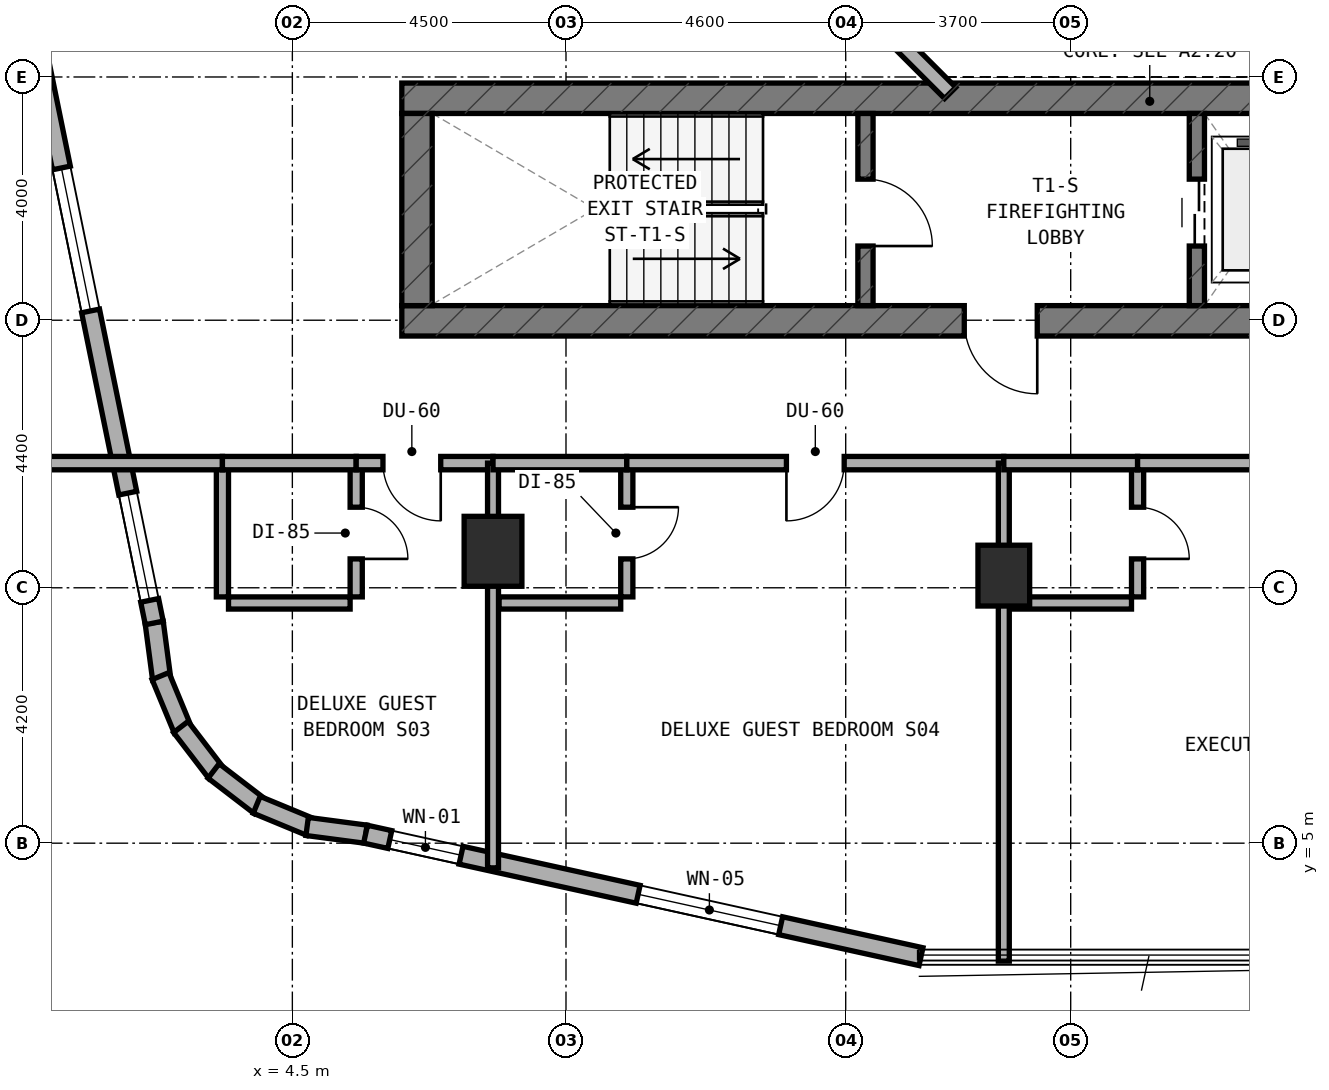
"""IFC4 building model, lengths in metres.
Left out: names, types, materials, properties, quantities, classifications, styles, units other than length and angle.
Written with IfcOpenShell. Run it as: python <this file> out.ifc"""

import sys

from ifc_helpers import new_model, si_unit, direction, frame, frame_2d, origin, origin_2d, place, context, subcontext, project, spatial, rectangle, extrude, element, fill, save


model = new_model("IFC4")
c1 = context("Model", 3, precision=1e-05, world=origin(), true_north=direction((0.0, 1.0)))
c2 = subcontext(c1, "Body", "Model", "MODEL_VIEW")
j1 = project(units=[si_unit("LENGTHUNIT", "METRE"), si_unit("PLANEANGLEUNIT", "RADIAN")], contexts=[c1])
p1 = place(None, origin())
s1 = spatial("IfcSite", under=j1, at=p1, CompositionType="ELEMENT")
p2 = place(p1, origin())
s2 = spatial("IfcBuilding", under=s1, at=p2, CompositionType="ELEMENT")
p3 = place(p2, frame((0.0, 0.0, 83.5)))
s3 = spatial("IfcBuildingStorey", under=s2, at=p3, CompositionType="ELEMENT", Elevation=83.5)
p4 = place(p3, frame((6.3, 13.59, 0.0), z_axis=(0.0, 0.0, 1.0), x_axis=(1.0, 0.0, 0.0)))
e1 = element("IfcWall", 1, at=p4, inside=s3, PredefinedType="SHEAR", context=c2, shape_type="SweptSolid", body=[
    extrude(rectangle(XDim=24.6, YDim=0.5, at=frame_2d((12.3, 0.0))), origin(), (0.0, 0.0, 1.0), 3.5),
])
p5 = place(p4, frame((9.25, 0.0, 0.0)))
e2 = element("IfcOpeningElement", 2, at=p5, cuts=e1, PredefinedType="OPENING", context=c2, shape_type="SweptSolid", body=[
    extrude(rectangle(XDim=1.2, YDim=2.15, at=frame_2d((0.6, 1.075))), frame((0.0, 0.26, 0.0), z_axis=(0.0, -1.0, 0.0), x_axis=(1.0, 0.0, 0.0)), (0.0, 0.0, 1.0), 0.52),
])
p6 = place(p4, frame((17.04, 0.0, 0.0)))
e3 = element("IfcOpeningElement", 3, at=p6, cuts=e1, PredefinedType="OPENING", context=c2, shape_type="SweptSolid", body=[
    extrude(rectangle(XDim=0.85, YDim=2.1, at=frame_2d((0.425, 1.05))), frame((0.0, 0.26, 0.0), z_axis=(0.0, -1.0, 0.0), x_axis=(1.0, 0.0, 0.0)), (0.0, 0.0, 1.0), 0.52),
])
p7 = place(p3, frame((6.3, 17.25, 0.0), z_axis=(0.0, 0.0, 1.0), x_axis=(1.0, 0.0, 0.0)))
e4 = element("IfcWall", 4, at=p7, inside=s3, PredefinedType="SHEAR", context=c2, shape_type="SweptSolid", body=[
    extrude(rectangle(XDim=24.6, YDim=0.5, at=frame_2d((12.3, 0.0))), origin(), (0.0, 0.0, 1.0), 3.5),
])
p8 = place(p3, frame((6.55, 13.84, 0.0), z_axis=(0.0, 0.0, 1.0), x_axis=(0.0, 1.0, 0.0)))
e5 = element("IfcWall", 5, at=p8, inside=s3, PredefinedType="SHEAR", context=c2, shape_type="SweptSolid", body=[
    extrude(rectangle(XDim=3.16, YDim=0.5, at=frame_2d((1.58, 0.0))), origin(), (0.0, 0.0, 1.0), 3.5),
])
p9 = place(p3, frame((13.925, 13.84, 0.0), z_axis=(0.0, 0.0, 1.0), x_axis=(0.0, 1.0, 0.0)))
e6 = element("IfcWall", 6, at=p9, inside=s3, PredefinedType="STANDARD", context=c2, shape_type="SweptSolid", body=[
    extrude(rectangle(XDim=3.16, YDim=0.25, at=frame_2d((1.58, 0.0))), origin(), (0.0, 0.0, 1.0), 3.22),
])
p10 = place(p9, frame((0.98, 0.0, 0.0)))
e7 = element("IfcOpeningElement", 7, at=p10, cuts=e6, PredefinedType="OPENING", context=c2, shape_type="SweptSolid", body=[
    extrude(rectangle(XDim=1.1, YDim=2.15, at=frame_2d((0.55, 1.075))), frame((0.0, 0.135, 0.0), z_axis=(0.0, -1.0, 0.0), x_axis=(1.0, 0.0, 0.0)), (0.0, 0.0, 1.0), 0.27),
])
p11 = place(p3, frame((19.375, 13.84, 0.0), z_axis=(0.0, 0.0, 1.0), x_axis=(0.0, 1.0, 0.0)))
e8 = element("IfcWall", 8, at=p11, inside=s3, PredefinedType="STANDARD", context=c2, shape_type="SweptSolid", body=[
    extrude(rectangle(XDim=3.16, YDim=0.25, at=frame_2d((1.58, 0.0))), origin(), (0.0, 0.0, 1.0), 3.22),
])
p12 = place(p11, frame((0.98, 0.0, 0.0)))
e9 = element("IfcOpeningElement", 9, at=p12, cuts=e8, PredefinedType="OPENING", context=c2, shape_type="SweptSolid", body=[
    extrude(rectangle(XDim=1.1, YDim=2.15, at=frame_2d((0.55, 1.075))), frame((0.0, 0.135, 0.0), z_axis=(0.0, -1.0, 0.0), x_axis=(1.0, 0.0, 0.0)), (0.0, 0.0, 1.0), 0.27),
])
p13 = place(p3, frame((16.2, 9.4, 0.0), z_axis=(0.0, 0.0, 1.0), x_axis=(1.0, 0.0, 0.0)))
e10 = element("IfcColumn", 10, at=p13, inside=s3, PredefinedType="COLUMN", context=c2, shape_type="SweptSolid", body=[
    extrude(rectangle(XDim=0.85, YDim=1.0, at=origin_2d()), origin(), (0.0, 0.0, 1.0), 3.5),
])
p14 = place(p3, frame((7.8, 9.8, 0.0), z_axis=(0.0, 0.0, 1.0), x_axis=(1.0, 0.0, 0.0)))
e11 = element("IfcColumn", 11, at=p14, inside=s3, PredefinedType="COLUMN", context=c2, shape_type="SweptSolid", body=[
    extrude(rectangle(XDim=0.95, YDim=1.15, at=origin_2d()), origin(), (0.0, 0.0, 1.0), 3.5),
])
p15 = place(p3, frame((2.228, 8.628, 0.0), z_axis=(0.0, 0.0, 1.0), x_axis=(0.131174864804, -0.991359246108, 0.0)))
e12 = element("IfcWall", 12, at=p15, inside=s3, PredefinedType="STANDARD", context=c2, shape_type="SweptSolid", body=[
    extrude(rectangle(XDim=0.938, YDim=0.3, at=frame_2d((0.469, 0.0))), origin(), (0.0, 0.0, 1.0), 3.22),
])
p16 = place(p3, frame((2.332, 7.748, 0.0), z_axis=(0.0, 0.0, 1.0), x_axis=(0.382344263057, -0.924019948111, 0.0)))
e13 = element("IfcWall", 13, at=p16, inside=s3, PredefinedType="STANDARD", context=c2, shape_type="SweptSolid", body=[
    extrude(rectangle(XDim=0.955, YDim=0.3, at=frame_2d((0.477, 0.0))), origin(), (0.0, 0.0, 1.0), 3.22),
])
for number, where, z_axis, x_axis in (
    (14, (2.666, 6.911, 0.0), (0.0, 0.0, 1.0), (0.608, -0.794, 0.0)),
    (15, (3.205, 6.188, 0.0), (0.0, 0.0, 1.0), (0.794, -0.608, 0.0)),
):
    element("IfcWall", number, at=place(p3, frame(where, z_axis=z_axis, x_axis=x_axis)), inside=s3, PredefinedType="STANDARD", context=c2, shape_type="SweptSolid", body=[
        extrude(rectangle(XDim=0.955, YDim=0.3, at=frame_2d((0.478, 0.0))), origin(), (0.0, 0.0, 1.0), 3.22),
    ])
p17 = place(p3, frame((3.914, 5.631, 0.0), z_axis=(0.0, 0.0, 1.0), x_axis=(0.923982547689, -0.382434636986, 0.0)))
e16 = element("IfcWall", 16, at=p17, inside=s3, PredefinedType="STANDARD", context=c2, shape_type="SweptSolid", body=[
    extrude(rectangle(XDim=0.954, YDim=0.3, at=frame_2d((0.477, 0.0))), origin(), (0.0, 0.0, 1.0), 3.22),
])
p18 = place(p3, frame((4.743, 5.275, 0.0), z_axis=(0.0, 0.0, 1.0), x_axis=(0.99145856342, -0.130422072598, 0.0)))
e17 = element("IfcWall", 17, at=p18, inside=s3, PredefinedType="STANDARD", context=c2, shape_type="SweptSolid", body=[
    extrude(rectangle(XDim=0.973, YDim=0.3, at=frame_2d((0.487, 0.0))), origin(), (0.0, 0.0, 1.0), 3.22),
])
p19 = place(p3, frame((5.704, 5.148, 0.0), z_axis=(0.0, 0.0, 1.0), x_axis=(0.9765437942, -0.215318875183, 0.0)))
e18 = element("IfcWall", 18, at=p19, inside=s3, PredefinedType="STANDARD", context=c2, shape_type="SweptSolid", body=[
    extrude(rectangle(XDim=9.353, YDim=0.3, at=frame_2d((4.677, 0.0))), origin(), (0.0, 0.0, 1.0), 3.22),
])
p20 = place(p19, frame((0.408, 0.0, 0.85)))
e19 = element("IfcOpeningElement", 19, at=p20, cuts=e18, PredefinedType="OPENING", context=c2, shape_type="SweptSolid", body=[
    extrude(rectangle(XDim=1.2, YDim=1.5, at=frame_2d((0.6, 0.75))), frame((0.0, 0.16, 0.0), z_axis=(0.0, -1.0, 0.0), x_axis=(1.0, 0.0, 0.0)), (0.0, 0.0, 1.0), 0.32),
])
p21 = place(p19, frame((4.59, 0.0, 0.8)))
e20 = element("IfcOpeningElement", 20, at=p21, cuts=e18, PredefinedType="OPENING", context=c2, shape_type="SweptSolid", body=[
    extrude(rectangle(XDim=2.4, YDim=1.6, at=frame_2d((1.2, 0.8))), frame((0.0, 0.16, 0.0), z_axis=(0.0, -1.0, 0.0), x_axis=(1.0, 0.0, 0.0)), (0.0, 0.0, 1.0), 0.32),
])
p22 = place(p3, frame((0.216, 18.484, 0.0), z_axis=(0.0, 0.0, 1.0), x_axis=(0.199990901713, -0.979797754249, 0.0)))
e21 = element("IfcWall", 21, at=p22, inside=s3, PredefinedType="STANDARD", context=c2, shape_type="SweptSolid", body=[
    extrude(rectangle(XDim=10.065, YDim=0.3, at=frame_2d((5.033, 0.0))), origin(), (0.0, 0.0, 1.0), 3.22),
])
p23 = place(p22, frame((2.429, 0.0, 0.8)))
e22 = element("IfcOpeningElement", 22, at=p23, cuts=e21, PredefinedType="OPENING", context=c2, shape_type="SweptSolid", body=[
    extrude(rectangle(XDim=2.4, YDim=1.6, at=frame_2d((1.2, 0.8))), frame((0.0, 0.16, 0.0), z_axis=(0.0, -1.0, 0.0), x_axis=(1.0, 0.0, 0.0)), (0.0, 0.0, 1.0), 0.32),
])
p24 = place(p22, frame((7.887, 0.0, 0.85)))
e23 = element("IfcOpeningElement", 23, at=p24, cuts=e21, PredefinedType="OPENING", context=c2, shape_type="SweptSolid", body=[
    extrude(rectangle(XDim=1.8, YDim=1.5, at=frame_2d((0.9, 0.75))), frame((0.0, 0.16, 0.0), z_axis=(0.0, -1.0, 0.0), x_axis=(1.0, 0.0, 0.0)), (0.0, 0.0, 1.0), 0.32),
])
p25 = place(p3, frame((13.484, 19.172, 0.0), z_axis=(0.0, 0.0, 1.0), x_axis=(0.707106781187, -0.707106781187, 0.0)))
e24 = element("IfcWall", 24, at=p25, inside=s3, PredefinedType="STANDARD", context=c2, shape_type="SweptSolid", body=[
    extrude(rectangle(XDim=2.594, YDim=0.26, at=frame_2d((1.297, 0.0))), origin(), (0.0, 0.0, 1.0), 3.22),
])
p26 = place(p3, frame((5.55, 9.05, 0.0), z_axis=(0.0, 0.0, 1.0), x_axis=(0.0, 1.0, 0.0)))
e25 = element("IfcWall", 25, at=p26, inside=s3, PredefinedType="PLUMBINGWALL", context=c2, shape_type="SweptSolid", body=[
    extrude(rectangle(XDim=2.1, YDim=0.2, at=frame_2d((1.05, 0.0))), origin(), (0.0, 0.0, 1.0), 3.22),
])
p27 = place(p26, frame((0.625, 0.0, 0.0)))
e26 = element("IfcOpeningElement", 26, at=p27, cuts=e25, PredefinedType="OPENING", context=c2, shape_type="SweptSolid", body=[
    extrude(rectangle(XDim=0.85, YDim=2.1, at=frame_2d((0.425, 1.05))), frame((0.0, 0.11, 0.0), z_axis=(0.0, -1.0, 0.0), x_axis=(1.0, 0.0, 0.0)), (0.0, 0.0, 1.0), 0.22),
])
p28 = place(p3, frame((3.45, 8.95, 0.0), z_axis=(0.0, 0.0, 1.0), x_axis=(1.0, 0.0, 0.0)))
e27 = element("IfcWall", 27, at=p28, inside=s3, PredefinedType="PLUMBINGWALL", context=c2, shape_type="SweptSolid", body=[
    extrude(rectangle(XDim=2.0, YDim=0.2, at=frame_2d((1.0, 0.0))), origin(), (0.0, 0.0, 1.0), 3.22),
])
p29 = place(p3, frame((3.35, 9.05, 0.0), z_axis=(0.0, 0.0, 1.0), x_axis=(0.0, 1.0, 0.0)))
e28 = element("IfcWall", 28, at=p29, inside=s3, PredefinedType="PLUMBINGWALL", context=c2, shape_type="SweptSolid", body=[
    extrude(rectangle(XDim=2.1, YDim=0.2, at=frame_2d((1.05, 0.0))), origin(), (0.0, 0.0, 1.0), 3.22),
])
p30 = place(p3, frame((0.24, 11.25, 0.0), z_axis=(0.0, 0.0, 1.0), x_axis=(1.0, 0.0, 0.0)))
e29 = element("IfcWall", 29, at=p30, inside=s3, PredefinedType="SOLIDWALL", context=c2, shape_type="SweptSolid", body=[
    extrude(rectangle(XDim=3.11, YDim=0.22, at=frame_2d((1.555, 0.0))), origin(), (0.0, 0.0, 1.0), 3.22),
])
p31 = place(p3, frame((3.35, 11.25, 0.0), z_axis=(0.0, 0.0, 1.0), x_axis=(1.0, 0.0, 0.0)))
e30 = element("IfcWall", 30, at=p31, inside=s3, PredefinedType="SOLIDWALL", context=c2, shape_type="SweptSolid", body=[
    extrude(rectangle(XDim=2.2, YDim=0.22, at=frame_2d((1.1, 0.0))), origin(), (0.0, 0.0, 1.0), 3.22),
])
p32 = place(p3, frame((5.55, 11.25, 0.0), z_axis=(0.0, 0.0, 1.0), x_axis=(1.0, 0.0, 0.0)))
e31 = element("IfcWall", 31, at=p32, inside=s3, PredefinedType="SOLIDWALL", context=c2, shape_type="SweptSolid", body=[
    extrude(rectangle(XDim=2.25, YDim=0.22, at=frame_2d((1.125, 0.0))), origin(), (0.0, 0.0, 1.0), 2.595),
])
p33 = place(p32, frame((0.44, 0.0, 0.0)))
e32 = element("IfcOpeningElement", 32, at=p33, cuts=e31, PredefinedType="OPENING", context=c2, shape_type="SweptSolid", body=[
    extrude(rectangle(XDim=0.95, YDim=2.1, at=frame_2d((0.475, 1.05))), frame((0.0, 0.12, 0.0), z_axis=(0.0, -1.0, 0.0), x_axis=(1.0, 0.0, 0.0)), (0.0, 0.0, 1.0), 0.24),
])
p34 = place(p3, frame((7.8, 4.594, 0.0), z_axis=(0.0, 0.0, 1.0), x_axis=(0.0, 1.0, 0.0)))
e33 = element("IfcWall", 33, at=p34, inside=s3, PredefinedType="SOLIDWALL", context=c2, shape_type="SweptSolid", body=[
    extrude(rectangle(XDim=6.656, YDim=0.18, at=frame_2d((3.328, 0.0))), origin(), (0.0, 0.0, 1.0), 2.595),
])
p35 = place(p3, frame((10.0, 9.05, 0.0), z_axis=(0.0, 0.0, 1.0), x_axis=(0.0, 1.0, 0.0)))
e34 = element("IfcWall", 34, at=p35, inside=s3, PredefinedType="PLUMBINGWALL", context=c2, shape_type="SweptSolid", body=[
    extrude(rectangle(XDim=2.1, YDim=0.2, at=frame_2d((1.05, 0.0))), origin(), (0.0, 0.0, 1.0), 2.745),
])
p36 = place(p35, frame((0.625, 0.0, 0.0)))
e35 = element("IfcOpeningElement", 35, at=p36, cuts=e34, PredefinedType="OPENING", context=c2, shape_type="SweptSolid", body=[
    extrude(rectangle(XDim=0.85, YDim=2.1, at=frame_2d((0.425, 1.05))), frame((0.0, 0.11, 0.0), z_axis=(0.0, -1.0, 0.0), x_axis=(1.0, 0.0, 0.0)), (0.0, 0.0, 1.0), 0.22),
])
p37 = place(p3, frame((7.9, 8.95, 0.0), z_axis=(0.0, 0.0, 1.0), x_axis=(1.0, 0.0, 0.0)))
e36 = element("IfcWall", 36, at=p37, inside=s3, PredefinedType="PLUMBINGWALL", context=c2, shape_type="SweptSolid", body=[
    extrude(rectangle(XDim=2.0, YDim=0.2, at=frame_2d((1.0, 0.0))), origin(), (0.0, 0.0, 1.0), 3.22),
])
p38 = place(p3, frame((7.8, 11.25, 0.0), z_axis=(0.0, 0.0, 1.0), x_axis=(1.0, 0.0, 0.0)))
e37 = element("IfcWall", 37, at=p38, inside=s3, PredefinedType="SOLIDWALL", context=c2, shape_type="SweptSolid", body=[
    extrude(rectangle(XDim=2.2, YDim=0.22, at=frame_2d((1.1, 0.0))), origin(), (0.0, 0.0, 1.0), 2.595),
])
p39 = place(p3, frame((10.0, 11.25, 0.0), z_axis=(0.0, 0.0, 1.0), x_axis=(1.0, 0.0, 0.0)))
e38 = element("IfcWall", 38, at=p39, inside=s3, PredefinedType="SOLIDWALL", context=c2, shape_type="SweptSolid", body=[
    extrude(rectangle(XDim=6.2, YDim=0.22, at=frame_2d((3.1, 0.0))), origin(), (0.0, 0.0, 1.0), 2.595),
])
p40 = place(p39, frame((2.625, 0.0, 0.0)))
e39 = element("IfcOpeningElement", 39, at=p40, cuts=e38, PredefinedType="OPENING", context=c2, shape_type="SweptSolid", body=[
    extrude(rectangle(XDim=0.95, YDim=2.1, at=frame_2d((0.475, 1.05))), frame((0.0, 0.12, 0.0), z_axis=(0.0, -1.0, 0.0), x_axis=(1.0, 0.0, 0.0)), (0.0, 0.0, 1.0), 0.24),
])
p41 = place(p3, frame((16.2, 3.06, 0.0), z_axis=(0.0, 0.0, 1.0), x_axis=(0.0, 1.0, 0.0)))
e40 = element("IfcWall", 40, at=p41, inside=s3, PredefinedType="SOLIDWALL", context=c2, shape_type="SweptSolid", body=[
    extrude(rectangle(XDim=8.19, YDim=0.18, at=frame_2d((4.095, 0.0))), origin(), (0.0, 0.0, 1.0), 2.595),
])
p42 = place(p3, frame((18.4, 9.05, 0.0), z_axis=(0.0, 0.0, 1.0), x_axis=(0.0, 1.0, 0.0)))
e41 = element("IfcWall", 41, at=p42, inside=s3, PredefinedType="PLUMBINGWALL", context=c2, shape_type="SweptSolid", body=[
    extrude(rectangle(XDim=2.1, YDim=0.2, at=frame_2d((1.05, 0.0))), origin(), (0.0, 0.0, 1.0), 2.745),
])
p43 = place(p42, frame((0.625, 0.0, 0.0)))
e42 = element("IfcOpeningElement", 42, at=p43, cuts=e41, PredefinedType="OPENING", context=c2, shape_type="SweptSolid", body=[
    extrude(rectangle(XDim=0.85, YDim=2.1, at=frame_2d((0.425, 1.05))), frame((0.0, 0.11, 0.0), z_axis=(0.0, -1.0, 0.0), x_axis=(1.0, 0.0, 0.0)), (0.0, 0.0, 1.0), 0.22),
])
p44 = place(p3, frame((16.3, 8.95, 0.0), z_axis=(0.0, 0.0, 1.0), x_axis=(1.0, 0.0, 0.0)))
e43 = element("IfcWall", 43, at=p44, inside=s3, PredefinedType="PLUMBINGWALL", context=c2, shape_type="SweptSolid", body=[
    extrude(rectangle(XDim=2.0, YDim=0.2, at=frame_2d((1.0, 0.0))), origin(), (0.0, 0.0, 1.0), 3.22),
])
p45 = place(p3, frame((16.2, 11.25, 0.0), z_axis=(0.0, 0.0, 1.0), x_axis=(1.0, 0.0, 0.0)))
e44 = element("IfcWall", 44, at=p45, inside=s3, PredefinedType="SOLIDWALL", context=c2, shape_type="SweptSolid", body=[
    extrude(rectangle(XDim=2.2, YDim=0.22, at=frame_2d((1.1, 0.0))), origin(), (0.0, 0.0, 1.0), 2.595),
])
p46 = place(p3, frame((18.4, 11.25, 0.0), z_axis=(0.0, 0.0, 1.0), x_axis=(1.0, 0.0, 0.0)))
e45 = element("IfcWall", 45, at=p46, inside=s3, PredefinedType="SOLIDWALL", context=c2, shape_type="SweptSolid", body=[
    extrude(rectangle(XDim=7.4, YDim=0.22, at=frame_2d((3.7, 0.0))), origin(), (0.0, 0.0, 1.0), 2.595),
])
p47 = place(p46, frame((3.225, 0.0, 0.0)))
e46 = element("IfcOpeningElement", 46, at=p47, cuts=e45, PredefinedType="OPENING", context=c2, shape_type="SweptSolid", body=[
    extrude(rectangle(XDim=0.95, YDim=2.1, at=frame_2d((0.475, 1.05))), frame((0.0, 0.12, 0.0), z_axis=(0.0, -1.0, 0.0), x_axis=(1.0, 0.0, 0.0)), (0.0, 0.0, 1.0), 0.24),
])
p48 = place(p20, origin())
e47 = element("IfcWindow", 47, at=p48, inside=s3, PartitioningType="SINGLE_PANEL", PredefinedType="WINDOW", context=c2, shape_type="SweptSolid", body=[
    extrude(rectangle(XDim=1.2, YDim=1.5, at=frame_2d((0.6, 0.75))), frame((0.0, 0.03, 0.0), z_axis=(0.0, -1.0, 0.0), x_axis=(1.0, 0.0, 0.0)), (0.0, 0.0, 1.0), 0.06),
])
fill(e19, e47)
p49 = place(p21, origin())
e48 = element("IfcWindow", 48, at=p49, inside=s3, PartitioningType="SINGLE_PANEL", PredefinedType="WINDOW", context=c2, shape_type="SweptSolid", body=[
    extrude(rectangle(XDim=2.4, YDim=1.6, at=frame_2d((1.2, 0.8))), frame((0.0, 0.03, 0.0), z_axis=(0.0, -1.0, 0.0), x_axis=(1.0, 0.0, 0.0)), (0.0, 0.0, 1.0), 0.06),
])
fill(e20, e48)
p50 = place(p23, origin())
e49 = element("IfcWindow", 49, at=p50, inside=s3, PartitioningType="SINGLE_PANEL", PredefinedType="WINDOW", context=c2, shape_type="SweptSolid", body=[
    extrude(rectangle(XDim=2.4, YDim=1.6, at=frame_2d((1.2, 0.8))), frame((0.0, 0.03, 0.0), z_axis=(0.0, -1.0, 0.0), x_axis=(1.0, 0.0, 0.0)), (0.0, 0.0, 1.0), 0.06),
])
fill(e22, e49)
p51 = place(p24, origin())
e50 = element("IfcWindow", 50, at=p51, inside=s3, PartitioningType="SINGLE_PANEL", PredefinedType="WINDOW", context=c2, shape_type="SweptSolid", body=[
    extrude(rectangle(XDim=1.8, YDim=1.5, at=frame_2d((0.9, 0.75))), frame((0.0, 0.03, 0.0), z_axis=(0.0, -1.0, 0.0), x_axis=(1.0, 0.0, 0.0)), (0.0, 0.0, 1.0), 0.06),
])
fill(e23, e50)
p52 = place(p10, frame((1.1, 0.0, 0.0), z_axis=(0.0, 0.0, 1.0), x_axis=(-1.0, 0.0, 0.0)))
e51 = element("IfcDoor", 51, at=p52, inside=s3, OperationType="SINGLE_SWING_RIGHT", PredefinedType="DOOR", context=c2, shape_type="SweptSolid", body=[
    extrude(rectangle(XDim=1.1, YDim=2.15, at=frame_2d((0.55, 1.075))), frame((0.0, 0.025, 0.0), z_axis=(0.0, -1.0, 0.0), x_axis=(1.0, 0.0, 0.0)), (0.0, 0.0, 1.0), 0.05),
])
fill(e7, e51)
p53 = place(p5, frame((1.2, 0.0, 0.0), z_axis=(0.0, 0.0, 1.0), x_axis=(-1.0, 0.0, 0.0)))
e52 = element("IfcDoor", 52, at=p53, inside=s3, OperationType="SINGLE_SWING_LEFT", PredefinedType="DOOR", context=c2, shape_type="SweptSolid", body=[
    extrude(rectangle(XDim=1.2, YDim=2.15, at=frame_2d((0.6, 1.075))), frame((0.0, 0.025, 0.0), z_axis=(0.0, -1.0, 0.0), x_axis=(1.0, 0.0, 0.0)), (0.0, 0.0, 1.0), 0.05),
])
fill(e2, e52)
p54 = place(p12, origin())
e53 = element("IfcDoor", 53, at=p54, inside=s3, OperationType="DOUBLE_DOOR_SLIDING", PredefinedType="DOOR", context=c2, shape_type="SweptSolid", body=[
    extrude(rectangle(XDim=1.1, YDim=2.15, at=frame_2d((0.55, 1.075))), frame((0.0, 0.025, 0.0), z_axis=(0.0, -1.0, 0.0), x_axis=(1.0, 0.0, 0.0)), (0.0, 0.0, 1.0), 0.05),
])
fill(e9, e53)
p55 = place(p27, frame((0.85, 0.0, 0.0), z_axis=(0.0, 0.0, 1.0), x_axis=(-1.0, 0.0, 0.0)))
e54 = element("IfcDoor", 54, at=p55, inside=s3, OperationType="SINGLE_SWING_RIGHT", PredefinedType="DOOR", context=c2, shape_type="SweptSolid", body=[
    extrude(rectangle(XDim=0.85, YDim=2.1, at=frame_2d((0.425, 1.05))), frame((0.0, 0.025, 0.0), z_axis=(0.0, -1.0, 0.0), x_axis=(1.0, 0.0, 0.0)), (0.0, 0.0, 1.0), 0.05),
])
fill(e26, e54)
p56 = place(p33, frame((0.95, 0.0, 0.0), z_axis=(0.0, 0.0, 1.0), x_axis=(-1.0, 0.0, 0.0)))
e55 = element("IfcDoor", 55, at=p56, inside=s3, OperationType="SINGLE_SWING_LEFT", PredefinedType="DOOR", context=c2, shape_type="SweptSolid", body=[
    extrude(rectangle(XDim=0.95, YDim=2.1, at=frame_2d((0.475, 1.05))), frame((0.0, 0.025, 0.0), z_axis=(0.0, -1.0, 0.0), x_axis=(1.0, 0.0, 0.0)), (0.0, 0.0, 1.0), 0.05),
])
fill(e32, e55)
p57 = place(p36, frame((0.85, 0.0, 0.0), z_axis=(0.0, 0.0, 1.0), x_axis=(-1.0, 0.0, 0.0)))
e56 = element("IfcDoor", 56, at=p57, inside=s3, OperationType="SINGLE_SWING_LEFT", PredefinedType="DOOR", context=c2, shape_type="SweptSolid", body=[
    extrude(rectangle(XDim=0.85, YDim=2.1, at=frame_2d((0.425, 1.05))), frame((0.0, 0.025, 0.0), z_axis=(0.0, -1.0, 0.0), x_axis=(1.0, 0.0, 0.0)), (0.0, 0.0, 1.0), 0.05),
])
fill(e35, e56)
p58 = place(p40, frame((0.95, 0.0, 0.0), z_axis=(0.0, 0.0, 1.0), x_axis=(-1.0, 0.0, 0.0)))
e57 = element("IfcDoor", 57, at=p58, inside=s3, OperationType="SINGLE_SWING_RIGHT", PredefinedType="DOOR", context=c2, shape_type="SweptSolid", body=[
    extrude(rectangle(XDim=0.95, YDim=2.1, at=frame_2d((0.475, 1.05))), frame((0.0, 0.025, 0.0), z_axis=(0.0, -1.0, 0.0), x_axis=(1.0, 0.0, 0.0)), (0.0, 0.0, 1.0), 0.05),
])
fill(e39, e57)
p59 = place(p43, frame((0.85, 0.0, 0.0), z_axis=(0.0, 0.0, 1.0), x_axis=(-1.0, 0.0, 0.0)))
e58 = element("IfcDoor", 58, at=p59, inside=s3, OperationType="SINGLE_SWING_RIGHT", PredefinedType="DOOR", context=c2, shape_type="SweptSolid", body=[
    extrude(rectangle(XDim=0.85, YDim=2.1, at=frame_2d((0.425, 1.05))), frame((0.0, 0.025, 0.0), z_axis=(0.0, -1.0, 0.0), x_axis=(1.0, 0.0, 0.0)), (0.0, 0.0, 1.0), 0.05),
])
fill(e42, e58)
save(model, sys.argv[1])
